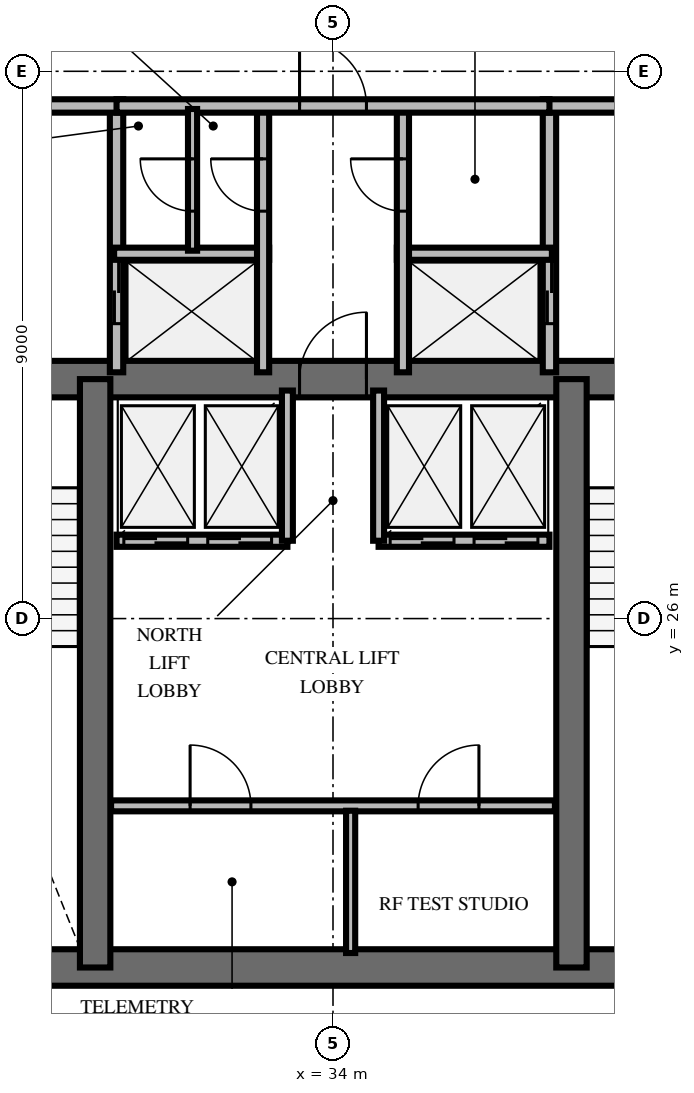
"""IFC4 building model, lengths in metres.
Left out: names, types, materials, properties, quantities, classifications, styles, units other than length and angle.
Written with IfcOpenShell. Run it as: python <this file> out.ifc"""

import sys

from ifc_helpers import new_model, si_unit, direction, frame, frame_2d, origin, place, context, subcontext, project, spatial, rectangle, extrude, element, fill, save


model = new_model("IFC4")
c1 = context("Model", 3, precision=1e-05, world=origin(), true_north=direction((0.0, 1.0)))
c2 = subcontext(c1, "Body", "Model", "MODEL_VIEW")
j1 = project(units=[si_unit("LENGTHUNIT", "METRE"), si_unit("PLANEANGLEUNIT", "RADIAN")], contexts=[c1])
p1 = place(None, origin())
s1 = spatial("IfcSite", under=j1, at=p1, CompositionType="ELEMENT")
p2 = place(p1, origin())
s2 = spatial("IfcBuilding", under=s1, at=p2, CompositionType="ELEMENT")
p3 = place(p2, frame((0.0, 0.0, 237.6)))
s3 = spatial("IfcBuildingStorey", under=s2, at=p3, CompositionType="ELEMENT", Elevation=237.6)
p4 = place(p3, frame((26.222, 20.262, 0.0), z_axis=(0.0, 0.0, 1.0), x_axis=(1.0, 0.0, 0.0)))
e1 = element("IfcWall", 1, at=p4, inside=s3, PredefinedType="SHEAR", context=c2, shape_type="SweptSolid", body=[
    extrude(rectangle(XDim=15.566, YDim=0.6, at=frame_2d((7.783, 0.0))), origin(), (0.0, 0.0, 1.0), 3.6),
])
p5 = place(p3, frame((26.222, 29.938, 0.0), z_axis=(0.0, 0.0, 1.0), x_axis=(1.0, 0.0, 0.0)))
e2 = element("IfcWall", 2, at=p5, inside=s3, PredefinedType="SHEAR", context=c2, shape_type="SweptSolid", body=[
    extrude(rectangle(XDim=15.566, YDim=0.6, at=frame_2d((7.783, 0.0))), origin(), (0.0, 0.0, 1.0), 3.6),
])
p6 = place(p5, frame((0.728, 0.0, 0.0)))
e3 = element("IfcOpeningElement", 3, at=p6, cuts=e2, PredefinedType="OPENING", context=c2, shape_type="SweptSolid", body=[
    extrude(rectangle(XDim=1.05, YDim=2.15, at=frame_2d((0.525, 1.075))), frame((0.0, 0.31, 0.0), z_axis=(0.0, -1.0, 0.0), x_axis=(1.0, 0.0, 0.0)), (0.0, 0.0, 1.0), 0.62),
])
p7 = place(p5, frame((13.778, 0.0, 0.0)))
e4 = element("IfcOpeningElement", 4, at=p7, cuts=e2, PredefinedType="OPENING", context=c2, shape_type="SweptSolid", body=[
    extrude(rectangle(XDim=1.05, YDim=2.15, at=frame_2d((0.525, 1.075))), frame((0.0, 0.31, 0.0), z_axis=(0.0, -1.0, 0.0), x_axis=(1.0, 0.0, 0.0)), (0.0, 0.0, 1.0), 0.62),
])
p8 = place(p5, frame((7.228, 0.0, 0.0)))
e5 = element("IfcOpeningElement", 5, at=p8, cuts=e2, PredefinedType="OPENING", context=c2, shape_type="SweptSolid", body=[
    extrude(rectangle(XDim=1.1, YDim=2.15, at=frame_2d((0.55, 1.075))), frame((0.0, 0.31, 0.0), z_axis=(0.0, -1.0, 0.0), x_axis=(1.0, 0.0, 0.0)), (0.0, 0.0, 1.0), 0.62),
])
for number, where, z_axis, x_axis in (
    (6, (30.088, 20.262, 0.0), (0.0, 0.0, 1.0), (0.0, 1.0, 0.0)),
    (7, (37.922, 20.262, 0.0), (0.0, 0.0, 1.0), (0.0, 1.0, 0.0)),
):
    element("IfcWall", number, at=place(p3, frame(where, z_axis=z_axis, x_axis=x_axis)), inside=s3, PredefinedType="SHEAR", context=c2, shape_type="SweptSolid", body=[
        extrude(rectangle(XDim=9.676, YDim=0.5, at=frame_2d((4.838, 0.0))), origin(), (0.0, 0.0, 1.0), 3.6),
    ])
p9 = place(p3, frame((30.44, 30.05, 0.0), z_axis=(0.0, 0.0, 1.0), x_axis=(0.0, 1.0, 0.0)))
e8 = element("IfcWall", 8, at=p9, inside=s3, PredefinedType="SOLIDWALL", context=c2, shape_type="SweptSolid", body=[
    extrude(rectangle(XDim=4.38, YDim=0.22, at=frame_2d((2.19, 0.0))), origin(), (0.0, 0.0, 1.0), 2.46),
])
p10 = place(p9, frame((0.8, 0.0, 0.0)))
e9 = element("IfcOpeningElement", 9, at=p10, cuts=e8, PredefinedType="OPENING", context=c2, shape_type="SweptSolid", body=[
    extrude(rectangle(XDim=1.05, YDim=2.1, at=frame_2d((0.525, 1.05))), frame((0.0, 0.12, 0.0), z_axis=(0.0, -1.0, 0.0), x_axis=(1.0, 0.0, 0.0)), (0.0, 0.0, 1.0), 0.24),
])
p11 = place(p3, frame((26.24, 34.43, 0.0), z_axis=(0.0, 0.0, 1.0), x_axis=(1.0, 0.0, 0.0)))
e10 = element("IfcWall", 10, at=p11, inside=s3, PredefinedType="SOLIDWALL", context=c2, shape_type="SweptSolid", body=[
    extrude(rectangle(XDim=4.31, YDim=0.22, at=frame_2d((2.155, 0.0))), origin(), (0.0, 0.0, 1.0), 2.46),
])
p12 = place(p11, frame((1.6, 0.0, 0.0)))
e11 = element("IfcOpeningElement", 11, at=p12, cuts=e10, PredefinedType="OPENING", context=c2, shape_type="SweptSolid", body=[
    extrude(rectangle(XDim=1.1, YDim=2.15, at=frame_2d((0.55, 1.075))), frame((0.0, 0.12, 0.0), z_axis=(0.0, -1.0, 0.0), x_axis=(1.0, 0.0, 0.0)), (0.0, 0.0, 1.0), 0.24),
])
p13 = place(p3, frame((30.4, 32.0, 0.0), z_axis=(0.0, 0.0, 1.0), x_axis=(1.0, 0.0, 0.0)))
e12 = element("IfcWall", 12, at=p13, inside=s3, PredefinedType="SOLIDWALL", context=c2, shape_type="SweptSolid", body=[
    extrude(rectangle(XDim=2.55, YDim=0.2, at=frame_2d((1.275, 0.0))), origin(), (0.0, 0.0, 1.0), 2.46),
])
p14 = place(p3, frame((32.85, 30.05, 0.0), z_axis=(0.0, 0.0, 1.0), x_axis=(0.0, 1.0, 0.0)))
e13 = element("IfcWall", 13, at=p14, inside=s3, PredefinedType="SOLIDWALL", context=c2, shape_type="SweptSolid", body=[
    extrude(rectangle(XDim=4.38, YDim=0.2, at=frame_2d((2.19, 0.0))), origin(), (0.0, 0.0, 1.0), 2.46),
])
p15 = place(p14, frame((2.65, 0.0, 0.0)))
e14 = element("IfcOpeningElement", 14, at=p15, cuts=e13, PredefinedType="OPENING", context=c2, shape_type="SweptSolid", body=[
    extrude(rectangle(XDim=0.86, YDim=2.05, at=frame_2d((0.43, 1.025))), frame((0.0, 0.11, 0.0), z_axis=(0.0, -1.0, 0.0), x_axis=(1.0, 0.0, 0.0)), (0.0, 0.0, 1.0), 0.22),
])
p16 = place(p3, frame((37.56, 30.05, 0.0), z_axis=(0.0, 0.0, 1.0), x_axis=(0.0, 1.0, 0.0)))
e15 = element("IfcWall", 15, at=p16, inside=s3, PredefinedType="SOLIDWALL", context=c2, shape_type="SweptSolid", body=[
    extrude(rectangle(XDim=4.38, YDim=0.22, at=frame_2d((2.19, 0.0))), origin(), (0.0, 0.0, 1.0), 2.46),
])
p17 = place(p16, frame((0.8, 0.0, 0.0)))
e16 = element("IfcOpeningElement", 16, at=p17, cuts=e15, PredefinedType="OPENING", context=c2, shape_type="SweptSolid", body=[
    extrude(rectangle(XDim=1.05, YDim=2.1, at=frame_2d((0.525, 1.05))), frame((0.0, 0.12, 0.0), z_axis=(0.0, -1.0, 0.0), x_axis=(1.0, 0.0, 0.0)), (0.0, 0.0, 1.0), 0.24),
])
p18 = place(p3, frame((37.45, 34.43, 0.0), z_axis=(0.0, 0.0, 1.0), x_axis=(1.0, 0.0, 0.0)))
e17 = element("IfcWall", 17, at=p18, inside=s3, PredefinedType="SOLIDWALL", context=c2, shape_type="SweptSolid", body=[
    extrude(rectangle(XDim=4.31, YDim=0.22, at=frame_2d((2.155, 0.0))), origin(), (0.0, 0.0, 1.0), 2.46),
])
p19 = place(p18, frame((1.6, 0.0, 0.0)))
e18 = element("IfcOpeningElement", 18, at=p19, cuts=e17, PredefinedType="OPENING", context=c2, shape_type="SweptSolid", body=[
    extrude(rectangle(XDim=1.1, YDim=2.15, at=frame_2d((0.55, 1.075))), frame((0.0, 0.12, 0.0), z_axis=(0.0, -1.0, 0.0), x_axis=(1.0, 0.0, 0.0)), (0.0, 0.0, 1.0), 0.24),
])
p20 = place(p3, frame((35.05, 32.0, 0.0), z_axis=(0.0, 0.0, 1.0), x_axis=(1.0, 0.0, 0.0)))
e19 = element("IfcWall", 19, at=p20, inside=s3, PredefinedType="SOLIDWALL", context=c2, shape_type="SweptSolid", body=[
    extrude(rectangle(XDim=2.55, YDim=0.2, at=frame_2d((1.275, 0.0))), origin(), (0.0, 0.0, 1.0), 2.46),
])
p21 = place(p3, frame((35.15, 30.05, 0.0), z_axis=(0.0, 0.0, 1.0), x_axis=(0.0, 1.0, 0.0)))
e20 = element("IfcWall", 20, at=p21, inside=s3, PredefinedType="SOLIDWALL", context=c2, shape_type="SweptSolid", body=[
    extrude(rectangle(XDim=4.38, YDim=0.2, at=frame_2d((2.19, 0.0))), origin(), (0.0, 0.0, 1.0), 2.46),
])
p22 = place(p21, frame((2.65, 0.0, 0.0)))
e21 = element("IfcOpeningElement", 21, at=p22, cuts=e20, PredefinedType="OPENING", context=c2, shape_type="SweptSolid", body=[
    extrude(rectangle(XDim=0.86, YDim=2.05, at=frame_2d((0.43, 1.025))), frame((0.0, 0.11, 0.0), z_axis=(0.0, -1.0, 0.0), x_axis=(1.0, 0.0, 0.0)), (0.0, 0.0, 1.0), 0.22),
])
p23 = place(p3, frame((30.44, 34.43, 0.0), z_axis=(0.0, 0.0, 1.0), x_axis=(1.0, 0.0, 0.0)))
e22 = element("IfcWall", 22, at=p23, inside=s3, PredefinedType="SOLIDWALL", context=c2, shape_type="SweptSolid", body=[
    extrude(rectangle(XDim=7.12, YDim=0.22, at=frame_2d((3.56, 0.0))), origin(), (0.0, 0.0, 1.0), 2.46),
])
p24 = place(p23, frame((3.01, 0.0, 0.0)))
e23 = element("IfcOpeningElement", 23, at=p24, cuts=e22, PredefinedType="OPENING", context=c2, shape_type="SweptSolid", body=[
    extrude(rectangle(XDim=1.1, YDim=2.15, at=frame_2d((0.55, 1.075))), frame((0.0, 0.12, 0.0), z_axis=(0.0, -1.0, 0.0), x_axis=(1.0, 0.0, 0.0)), (0.0, 0.0, 1.0), 0.24),
])
p25 = place(p3, frame((31.69, 32.05, 0.0), z_axis=(0.0, 0.0, 1.0), x_axis=(0.0, 1.0, 0.0)))
e24 = element("IfcWall", 24, at=p25, inside=s3, PredefinedType="PARTITIONING", context=c2, shape_type="SweptSolid", body=[
    extrude(rectangle(XDim=2.33, YDim=0.15, at=frame_2d((1.165, 0.0))), origin(), (0.0, 0.0, 1.0), 2.46),
])
p26 = place(p25, frame((0.65, 0.0, 0.0)))
e25 = element("IfcOpeningElement", 25, at=p26, cuts=e24, PredefinedType="OPENING", context=c2, shape_type="SweptSolid", body=[
    extrude(rectangle(XDim=0.86, YDim=2.05, at=frame_2d((0.43, 1.025))), frame((0.0, 0.085, 0.0), z_axis=(0.0, -1.0, 0.0), x_axis=(1.0, 0.0, 0.0)), (0.0, 0.0, 1.0), 0.17),
])
p27 = place(p3, frame((30.35, 22.92, 0.0), z_axis=(0.0, 0.0, 1.0), x_axis=(1.0, 0.0, 0.0)))
e26 = element("IfcWall", 26, at=p27, inside=s3, PredefinedType="PARTITIONING", context=c2, shape_type="SweptSolid", body=[
    extrude(rectangle(XDim=7.3, YDim=0.18, at=frame_2d((3.65, 0.0))), origin(), (0.0, 0.0, 1.0), 2.46),
])
p28 = place(p27, frame((1.3, 0.0, 0.0)))
e27 = element("IfcOpeningElement", 27, at=p28, cuts=e26, PredefinedType="OPENING", context=c2, shape_type="SweptSolid", body=[
    extrude(rectangle(XDim=1.0, YDim=2.15, at=frame_2d((0.5, 1.075))), frame((0.0, 0.1, 0.0), z_axis=(0.0, -1.0, 0.0), x_axis=(1.0, 0.0, 0.0)), (0.0, 0.0, 1.0), 0.2),
])
p29 = place(p27, frame((5.05, 0.0, 0.0)))
e28 = element("IfcOpeningElement", 28, at=p29, cuts=e26, PredefinedType="OPENING", context=c2, shape_type="SweptSolid", body=[
    extrude(rectangle(XDim=1.0, YDim=2.15, at=frame_2d((0.5, 1.075))), frame((0.0, 0.1, 0.0), z_axis=(0.0, -1.0, 0.0), x_axis=(1.0, 0.0, 0.0)), (0.0, 0.0, 1.0), 0.2),
])
p30 = place(p3, frame((34.29, 20.5, 0.0), z_axis=(0.0, 0.0, 1.0), x_axis=(0.0, 1.0, 0.0)))
e29 = element("IfcWall", 29, at=p30, inside=s3, PredefinedType="PARTITIONING", context=c2, shape_type="SweptSolid", body=[
    extrude(rectangle(XDim=2.34, YDim=0.15, at=frame_2d((1.17, 0.0))), origin(), (0.0, 0.0, 1.0), 2.46),
])
p31 = place(p3, frame((30.44, 27.28, 0.0), z_axis=(0.0, 0.0, 1.0), x_axis=(1.0, 0.0, 0.0)))
e30 = element("IfcWall", 30, at=p31, inside=s3, PredefinedType="SOLIDWALL", context=c2, shape_type="SweptSolid", body=[
    extrude(rectangle(XDim=2.81, YDim=0.2, at=frame_2d((1.405, 0.0))), origin(), (0.0, 0.0, 1.0), 2.46),
])
p32 = place(p31, frame((0.12, 0.0, 0.0)))
e31 = element("IfcOpeningElement", 31, at=p32, cuts=e30, PredefinedType="OPENING", context=c2, shape_type="SweptSolid", body=[
    extrude(rectangle(XDim=1.05, YDim=2.1, at=frame_2d((0.525, 1.05))), frame((0.0, 0.11, 0.0), z_axis=(0.0, -1.0, 0.0), x_axis=(1.0, 0.0, 0.0)), (0.0, 0.0, 1.0), 0.22),
])
p33 = place(p31, frame((1.5, 0.0, 0.0)))
e32 = element("IfcOpeningElement", 32, at=p33, cuts=e30, PredefinedType="OPENING", context=c2, shape_type="SweptSolid", body=[
    extrude(rectangle(XDim=1.05, YDim=2.1, at=frame_2d((0.525, 1.05))), frame((0.0, 0.11, 0.0), z_axis=(0.0, -1.0, 0.0), x_axis=(1.0, 0.0, 0.0)), (0.0, 0.0, 1.0), 0.22),
])
p34 = place(p3, frame((33.25, 27.28, 0.0), z_axis=(0.0, 0.0, 1.0), x_axis=(0.0, 1.0, 0.0)))
e33 = element("IfcWall", 33, at=p34, inside=s3, PredefinedType="SOLIDWALL", context=c2, shape_type="SweptSolid", body=[
    extrude(rectangle(XDim=2.47, YDim=0.18, at=frame_2d((1.235, 0.0))), origin(), (0.0, 0.0, 1.0), 2.46),
])
p35 = place(p3, frame((34.75, 27.28, 0.0), z_axis=(0.0, 0.0, 1.0), x_axis=(1.0, 0.0, 0.0)))
e34 = element("IfcWall", 34, at=p35, inside=s3, PredefinedType="SOLIDWALL", context=c2, shape_type="SweptSolid", body=[
    extrude(rectangle(XDim=2.81, YDim=0.2, at=frame_2d((1.405, 0.0))), origin(), (0.0, 0.0, 1.0), 2.46),
])
p36 = place(p35, frame((0.19, 0.0, 0.0)))
e35 = element("IfcOpeningElement", 35, at=p36, cuts=e34, PredefinedType="OPENING", context=c2, shape_type="SweptSolid", body=[
    extrude(rectangle(XDim=1.05, YDim=2.1, at=frame_2d((0.525, 1.05))), frame((0.0, 0.11, 0.0), z_axis=(0.0, -1.0, 0.0), x_axis=(1.0, 0.0, 0.0)), (0.0, 0.0, 1.0), 0.22),
])
p37 = place(p35, frame((1.57, 0.0, 0.0)))
e36 = element("IfcOpeningElement", 36, at=p37, cuts=e34, PredefinedType="OPENING", context=c2, shape_type="SweptSolid", body=[
    extrude(rectangle(XDim=1.05, YDim=2.1, at=frame_2d((0.525, 1.05))), frame((0.0, 0.11, 0.0), z_axis=(0.0, -1.0, 0.0), x_axis=(1.0, 0.0, 0.0)), (0.0, 0.0, 1.0), 0.22),
])
p38 = place(p3, frame((34.75, 27.28, 0.0), z_axis=(0.0, 0.0, 1.0), x_axis=(0.0, 1.0, 0.0)))
e37 = element("IfcWall", 37, at=p38, inside=s3, PredefinedType="SOLIDWALL", context=c2, shape_type="SweptSolid", body=[
    extrude(rectangle(XDim=2.47, YDim=0.18, at=frame_2d((1.235, 0.0))), origin(), (0.0, 0.0, 1.0), 2.46),
])
p39 = place(p3, frame((27.5, 35.219, 0.0), z_axis=(0.0, 0.0, 1.0), x_axis=(0.953228121756, 0.302251795518, 0.0)))
e38 = element("IfcWall", 38, at=p39, inside=s3, PredefinedType="PARTITIONING", context=c2, shape_type="SweptSolid", body=[
    extrude(rectangle(XDim=6.819, YDim=0.18, at=frame_2d((3.409, 0.0))), origin(), (0.0, 0.0, 1.0), 2.46),
])
p40 = place(p39, frame((2.86, 0.0, 0.0)))
e39 = element("IfcOpeningElement", 39, at=p40, cuts=e38, PredefinedType="OPENING", context=c2, shape_type="SweptSolid", body=[
    extrude(rectangle(XDim=1.1, YDim=2.15, at=frame_2d((0.55, 1.075))), frame((0.0, 0.1, 0.0), z_axis=(0.0, -1.0, 0.0), x_axis=(1.0, 0.0, 0.0)), (0.0, 0.0, 1.0), 0.2),
])
p41 = place(p3, frame((34.0, 37.28, 0.0), z_axis=(0.0, 0.0, 1.0), x_axis=(0.953228121756, -0.302251795518, 0.0)))
e40 = element("IfcWall", 40, at=p41, inside=s3, PredefinedType="PARTITIONING", context=c2, shape_type="SweptSolid", body=[
    extrude(rectangle(XDim=6.819, YDim=0.18, at=frame_2d((3.409, 0.0))), origin(), (0.0, 0.0, 1.0), 2.46),
])
p42 = place(p41, frame((2.86, 0.0, 0.0)))
e41 = element("IfcOpeningElement", 41, at=p42, cuts=e40, PredefinedType="OPENING", context=c2, shape_type="SweptSolid", body=[
    extrude(rectangle(XDim=1.1, YDim=2.15, at=frame_2d((0.55, 1.075))), frame((0.0, 0.1, 0.0), z_axis=(0.0, -1.0, 0.0), x_axis=(1.0, 0.0, 0.0)), (0.0, 0.0, 1.0), 0.2),
])
p43 = place(p8, origin())
e42 = element("IfcDoor", 42, at=p43, inside=s3, OperationType="SINGLE_SWING_RIGHT", PredefinedType="DOOR", context=c2, shape_type="SweptSolid", body=[
    extrude(rectangle(XDim=1.1, YDim=2.15, at=frame_2d((0.55, 1.075))), frame((0.0, 0.025, 0.0), z_axis=(0.0, -1.0, 0.0), x_axis=(1.0, 0.0, 0.0)), (0.0, 0.0, 1.0), 0.05),
])
fill(e5, e42)
p44 = place(p10, origin())
e43 = element("IfcDoor", 43, at=p44, inside=s3, OperationType="DOUBLE_DOOR_SLIDING", PredefinedType="USERDEFINED", context=c2, shape_type="SweptSolid", body=[
    extrude(rectangle(XDim=1.05, YDim=2.1, at=frame_2d((0.525, 1.05))), frame((0.0, 0.025, 0.0), z_axis=(0.0, -1.0, 0.0), x_axis=(1.0, 0.0, 0.0)), (0.0, 0.0, 1.0), 0.05),
])
fill(e9, e43)
p45 = place(p15, origin())
e44 = element("IfcDoor", 44, at=p45, inside=s3, OperationType="SINGLE_SWING_RIGHT", PredefinedType="TRAPDOOR", context=c2, shape_type="SweptSolid", body=[
    extrude(rectangle(XDim=0.86, YDim=2.05, at=frame_2d((0.43, 1.025))), frame((0.0, 0.025, 0.0), z_axis=(0.0, -1.0, 0.0), x_axis=(1.0, 0.0, 0.0)), (0.0, 0.0, 1.0), 0.05),
])
fill(e14, e44)
p46 = place(p17, origin())
e45 = element("IfcDoor", 45, at=p46, inside=s3, OperationType="DOUBLE_DOOR_SLIDING", PredefinedType="USERDEFINED", context=c2, shape_type="SweptSolid", body=[
    extrude(rectangle(XDim=1.05, YDim=2.1, at=frame_2d((0.525, 1.05))), frame((0.0, 0.025, 0.0), z_axis=(0.0, -1.0, 0.0), x_axis=(1.0, 0.0, 0.0)), (0.0, 0.0, 1.0), 0.05),
])
fill(e16, e45)
p47 = place(p22, origin())
e46 = element("IfcDoor", 46, at=p47, inside=s3, OperationType="SINGLE_SWING_RIGHT", PredefinedType="TRAPDOOR", context=c2, shape_type="SweptSolid", body=[
    extrude(rectangle(XDim=0.86, YDim=2.05, at=frame_2d((0.43, 1.025))), frame((0.0, 0.025, 0.0), z_axis=(0.0, -1.0, 0.0), x_axis=(1.0, 0.0, 0.0)), (0.0, 0.0, 1.0), 0.05),
])
fill(e21, e46)
p48 = place(p24, origin())
e47 = element("IfcDoor", 47, at=p48, inside=s3, OperationType="SINGLE_SWING_LEFT", PredefinedType="DOOR", context=c2, shape_type="SweptSolid", body=[
    extrude(rectangle(XDim=1.1, YDim=2.15, at=frame_2d((0.55, 1.075))), frame((0.0, 0.025, 0.0), z_axis=(0.0, -1.0, 0.0), x_axis=(1.0, 0.0, 0.0)), (0.0, 0.0, 1.0), 0.05),
])
fill(e23, e47)
p49 = place(p26, origin())
e48 = element("IfcDoor", 48, at=p49, inside=s3, OperationType="SINGLE_SWING_RIGHT", PredefinedType="TRAPDOOR", context=c2, shape_type="SweptSolid", body=[
    extrude(rectangle(XDim=0.86, YDim=2.05, at=frame_2d((0.43, 1.025))), frame((0.0, 0.025, 0.0), z_axis=(0.0, -1.0, 0.0), x_axis=(1.0, 0.0, 0.0)), (0.0, 0.0, 1.0), 0.05),
])
fill(e25, e48)
p50 = place(p28, origin())
e49 = element("IfcDoor", 49, at=p50, inside=s3, OperationType="SINGLE_SWING_LEFT", PredefinedType="DOOR", context=c2, shape_type="SweptSolid", body=[
    extrude(rectangle(XDim=1.0, YDim=2.15, at=frame_2d((0.5, 1.075))), frame((0.0, 0.025, 0.0), z_axis=(0.0, -1.0, 0.0), x_axis=(1.0, 0.0, 0.0)), (0.0, 0.0, 1.0), 0.05),
])
fill(e27, e49)
p51 = place(p29, origin())
e50 = element("IfcDoor", 50, at=p51, inside=s3, OperationType="SINGLE_SWING_RIGHT", PredefinedType="DOOR", context=c2, shape_type="SweptSolid", body=[
    extrude(rectangle(XDim=1.0, YDim=2.15, at=frame_2d((0.5, 1.075))), frame((0.0, 0.025, 0.0), z_axis=(0.0, -1.0, 0.0), x_axis=(1.0, 0.0, 0.0)), (0.0, 0.0, 1.0), 0.05),
])
fill(e28, e50)
p52 = place(p32, origin())
e51 = element("IfcDoor", 51, at=p52, inside=s3, OperationType="DOUBLE_DOOR_SLIDING", PredefinedType="USERDEFINED", context=c2, shape_type="SweptSolid", body=[
    extrude(rectangle(XDim=1.05, YDim=2.1, at=frame_2d((0.525, 1.05))), frame((0.0, 0.025, 0.0), z_axis=(0.0, -1.0, 0.0), x_axis=(1.0, 0.0, 0.0)), (0.0, 0.0, 1.0), 0.05),
])
fill(e31, e51)
p53 = place(p33, origin())
e52 = element("IfcDoor", 52, at=p53, inside=s3, OperationType="DOUBLE_DOOR_SLIDING", PredefinedType="USERDEFINED", context=c2, shape_type="SweptSolid", body=[
    extrude(rectangle(XDim=1.05, YDim=2.1, at=frame_2d((0.525, 1.05))), frame((0.0, 0.025, 0.0), z_axis=(0.0, -1.0, 0.0), x_axis=(1.0, 0.0, 0.0)), (0.0, 0.0, 1.0), 0.05),
])
fill(e32, e52)
p54 = place(p36, origin())
e53 = element("IfcDoor", 53, at=p54, inside=s3, OperationType="DOUBLE_DOOR_SLIDING", PredefinedType="USERDEFINED", context=c2, shape_type="SweptSolid", body=[
    extrude(rectangle(XDim=1.05, YDim=2.1, at=frame_2d((0.525, 1.05))), frame((0.0, 0.025, 0.0), z_axis=(0.0, -1.0, 0.0), x_axis=(1.0, 0.0, 0.0)), (0.0, 0.0, 1.0), 0.05),
])
fill(e35, e53)
p55 = place(p37, origin())
e54 = element("IfcDoor", 54, at=p55, inside=s3, OperationType="DOUBLE_DOOR_SLIDING", PredefinedType="USERDEFINED", context=c2, shape_type="SweptSolid", body=[
    extrude(rectangle(XDim=1.05, YDim=2.1, at=frame_2d((0.525, 1.05))), frame((0.0, 0.025, 0.0), z_axis=(0.0, -1.0, 0.0), x_axis=(1.0, 0.0, 0.0)), (0.0, 0.0, 1.0), 0.05),
])
fill(e36, e54)
save(model, sys.argv[1])
